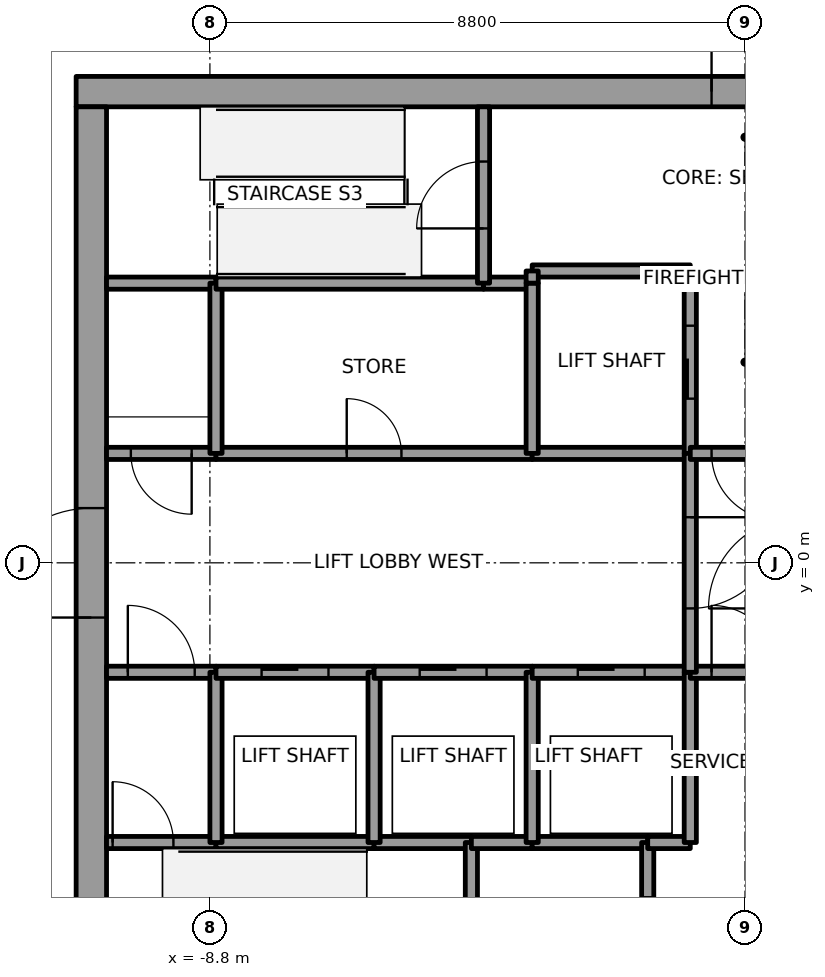
"""IFC4 building model, lengths in metres.
Left out: names, types, materials, properties, quantities, classifications, styles, units other than length and angle.
Written with IfcOpenShell. Run it as: python <this file> out.ifc"""

import sys

from ifc_helpers import new_model, si_unit, direction, frame, frame_2d, origin, place, context, subcontext, project, spatial, rectangle, extrude, element, fill, save


model = new_model("IFC4")
c1 = context("Model", 3, precision=1e-05, world=origin(), true_north=direction((0.0, 1.0)))
c2 = subcontext(c1, "Body", "Model", "MODEL_VIEW")
j1 = project(units=[si_unit("LENGTHUNIT", "METRE"), si_unit("PLANEANGLEUNIT", "RADIAN")], contexts=[c1])
p1 = place(None, origin())
s1 = spatial("IfcSite", under=j1, at=p1, CompositionType="ELEMENT")
p2 = place(p1, origin())
s2 = spatial("IfcBuilding", under=s1, at=p2, CompositionType="ELEMENT")
p3 = place(p2, frame((0.0, 0.0, 291.0)))
s3 = spatial("IfcBuildingStorey", under=s2, at=p3, CompositionType="ELEMENT", Elevation=291.0)
p4 = place(p3, frame((-11.0, 7.75, 0.0), z_axis=(0.0, 0.0, 1.0), x_axis=(1.0, 0.0, 0.0)))
e1 = element("IfcWall", 1, at=p4, inside=s3, PredefinedType="SHEAR", context=c2, shape_type="SweptSolid", body=[
    extrude(rectangle(XDim=22.0, YDim=0.5, at=frame_2d((11.0, 0.0))), origin(), (0.0, 0.0, 1.0), 4.0),
])
p5 = place(p4, frame((10.45, 0.0, 0.0)))
e2 = element("IfcOpeningElement", 2, at=p5, cuts=e1, PredefinedType="OPENING", context=c2, shape_type="SweptSolid", body=[
    extrude(rectangle(XDim=1.1, YDim=2.1, at=frame_2d((0.55, 1.05))), frame((0.0, 0.25, 0.0), z_axis=(0.0, -1.0, 0.0), x_axis=(1.0, 0.0, 0.0)), (0.0, 0.0, 1.0), 0.5),
])
p6 = place(p3, frame((-10.75, -7.5, 0.0), z_axis=(0.0, 0.0, 1.0), x_axis=(0.0, 1.0, 0.0)))
e3 = element("IfcWall", 3, at=p6, inside=s3, PredefinedType="SHEAR", context=c2, shape_type="SweptSolid", body=[
    extrude(rectangle(XDim=15.0, YDim=0.5, at=frame_2d((7.5, 0.0))), origin(), (0.0, 0.0, 1.0), 4.0),
])
p7 = place(p6, frame((6.6, 0.0, 0.0)))
e4 = element("IfcOpeningElement", 4, at=p7, cuts=e3, PredefinedType="OPENING", context=c2, shape_type="SweptSolid", body=[
    extrude(rectangle(XDim=1.8, YDim=2.1, at=frame_2d((0.9, 1.05))), frame((0.0, 0.25, 0.0), z_axis=(0.0, -1.0, 0.0), x_axis=(1.0, 0.0, 0.0)), (0.0, 0.0, 1.0), 0.5),
])
p8 = place(p3, frame((-10.5, -4.6, 0.0), z_axis=(0.0, 0.0, 1.0), x_axis=(1.0, 0.0, 0.0)))
e5 = element("IfcWall", 5, at=p8, inside=s3, PredefinedType="SOLIDWALL", context=c2, shape_type="SweptSolid", body=[
    extrude(rectangle(XDim=1.8, YDim=0.2, at=frame_2d((0.9, 0.0))), origin(), (0.0, 0.0, 1.0), 3.85),
])
p9 = place(p8, frame((0.1, 0.0, 0.0)))
e6 = element("IfcOpeningElement", 6, at=p9, cuts=e5, PredefinedType="OPENING", context=c2, shape_type="SweptSolid", body=[
    extrude(rectangle(XDim=1.0, YDim=2.1, at=frame_2d((0.5, 1.05))), frame((0.0, 0.1, 0.0), z_axis=(0.0, -1.0, 0.0), x_axis=(1.0, 0.0, 0.0)), (0.0, 0.0, 1.0), 0.2),
])
p10 = place(p3, frame((-10.5, -1.8, 0.0), z_axis=(0.0, 0.0, 1.0), x_axis=(1.0, 0.0, 0.0)))
e7 = element("IfcWall", 7, at=p10, inside=s3, PredefinedType="SOLIDWALL", context=c2, shape_type="SweptSolid", body=[
    extrude(rectangle(XDim=1.8, YDim=0.2, at=frame_2d((0.9, 0.0))), origin(), (0.0, 0.0, 1.0), 3.85),
])
p11 = place(p10, frame((0.35, 0.0, 0.0)))
e8 = element("IfcOpeningElement", 8, at=p11, cuts=e7, PredefinedType="OPENING", context=c2, shape_type="SweptSolid", body=[
    extrude(rectangle(XDim=1.1, YDim=2.1, at=frame_2d((0.55, 1.05))), frame((0.0, 0.1, 0.0), z_axis=(0.0, -1.0, 0.0), x_axis=(1.0, 0.0, 0.0)), (0.0, 0.0, 1.0), 0.2),
])
p12 = place(p3, frame((-8.7, 1.8, 0.0), z_axis=(0.0, 0.0, 1.0), x_axis=(-1.0, 0.0, 0.0)))
e9 = element("IfcWall", 9, at=p12, inside=s3, PredefinedType="SOLIDWALL", context=c2, shape_type="SweptSolid", body=[
    extrude(rectangle(XDim=1.8, YDim=0.2, at=frame_2d((0.9, 0.0))), origin(), (0.0, 0.0, 1.0), 3.85),
])
p13 = place(p12, frame((0.4, 0.0, 0.0)))
e10 = element("IfcOpeningElement", 10, at=p13, cuts=e9, PredefinedType="OPENING", context=c2, shape_type="SweptSolid", body=[
    extrude(rectangle(XDim=1.0, YDim=2.1, at=frame_2d((0.5, 1.05))), frame((0.0, 0.1, 0.0), z_axis=(0.0, -1.0, 0.0), x_axis=(1.0, 0.0, 0.0)), (0.0, 0.0, 1.0), 0.2),
])
p14 = place(p3, frame((-8.7, 4.6, 0.0), z_axis=(0.0, 0.0, 1.0), x_axis=(-1.0, 0.0, 0.0)))
e11 = element("IfcWall", 11, at=p14, inside=s3, PredefinedType="SOLIDWALL", context=c2, shape_type="SweptSolid", body=[
    extrude(rectangle(XDim=1.8, YDim=0.2, at=frame_2d((0.9, 0.0))), origin(), (0.0, 0.0, 1.0), 3.85),
])
p15 = place(p3, frame((-8.7, -4.6, 0.0), z_axis=(0.0, 0.0, 1.0), x_axis=(1.0, 0.0, 0.0)))
e12 = element("IfcWall", 12, at=p15, inside=s3, PredefinedType="SOLIDWALL", context=c2, shape_type="SweptSolid", body=[
    extrude(rectangle(XDim=2.6, YDim=0.2, at=frame_2d((1.3, 0.0))), origin(), (0.0, 0.0, 1.0), 3.85),
])
p16 = place(p3, frame((-8.7, -4.6, 0.0), z_axis=(0.0, 0.0, 1.0), x_axis=(0.0, 1.0, 0.0)))
e13 = element("IfcWall", 13, at=p16, inside=s3, PredefinedType="SOLIDWALL", context=c2, shape_type="SweptSolid", body=[
    extrude(rectangle(XDim=2.8, YDim=0.2, at=frame_2d((1.4, 0.0))), origin(), (0.0, 0.0, 1.0), 3.85),
])
p17 = place(p3, frame((-8.7, -1.8, 0.0), z_axis=(0.0, 0.0, 1.0), x_axis=(1.0, 0.0, 0.0)))
e14 = element("IfcWall", 14, at=p17, inside=s3, PredefinedType="SOLIDWALL", context=c2, shape_type="SweptSolid", body=[
    extrude(rectangle(XDim=2.6, YDim=0.2, at=frame_2d((1.3, 0.0))), origin(), (0.0, 0.0, 1.0), 3.85),
])
p18 = place(p17, frame((0.75, 0.0, 0.0)))
e15 = element("IfcOpeningElement", 15, at=p18, cuts=e14, PredefinedType="OPENING", context=c2, shape_type="SweptSolid", body=[
    extrude(rectangle(XDim=1.1, YDim=2.1, at=frame_2d((0.55, 1.05))), frame((0.0, 0.1, 0.0), z_axis=(0.0, -1.0, 0.0), x_axis=(1.0, 0.0, 0.0)), (0.0, 0.0, 1.0), 0.2),
])
p19 = place(p3, frame((-8.7, 1.8, 0.0), z_axis=(0.0, 0.0, 1.0), x_axis=(1.0, 0.0, 0.0)))
e16 = element("IfcWall", 16, at=p19, inside=s3, PredefinedType="SOLIDWALL", context=c2, shape_type="SweptSolid", body=[
    extrude(rectangle(XDim=5.2, YDim=0.2, at=frame_2d((2.6, 0.0))), origin(), (0.0, 0.0, 1.0), 3.85),
])
p20 = place(p19, frame((2.15, 0.0, 0.0)))
e17 = element("IfcOpeningElement", 17, at=p20, cuts=e16, PredefinedType="OPENING", context=c2, shape_type="SweptSolid", body=[
    extrude(rectangle(XDim=0.9, YDim=2.1, at=frame_2d((0.45, 1.05))), frame((0.0, 0.1, 0.0), z_axis=(0.0, -1.0, 0.0), x_axis=(1.0, 0.0, 0.0)), (0.0, 0.0, 1.0), 0.2),
])
p21 = place(p3, frame((-8.7, 4.6, 0.0), z_axis=(0.0, 0.0, 1.0), x_axis=(0.0, -1.0, 0.0)))
e18 = element("IfcWall", 18, at=p21, inside=s3, PredefinedType="SOLIDWALL", context=c2, shape_type="SweptSolid", body=[
    extrude(rectangle(XDim=2.8, YDim=0.2, at=frame_2d((1.4, 0.0))), origin(), (0.0, 0.0, 1.0), 3.85),
])
p22 = place(p3, frame((-4.3, 4.6, 0.0), z_axis=(0.0, 0.0, 1.0), x_axis=(-1.0, 0.0, 0.0)))
e19 = element("IfcWall", 19, at=p22, inside=s3, PredefinedType="SOLIDWALL", context=c2, shape_type="SweptSolid", body=[
    extrude(rectangle(XDim=4.4, YDim=0.2, at=frame_2d((2.2, 0.0))), origin(), (0.0, 0.0, 1.0), 3.85),
])
p23 = place(p3, frame((-6.1, -4.6, 0.0), z_axis=(0.0, 0.0, 1.0), x_axis=(1.0, 0.0, 0.0)))
e20 = element("IfcWall", 20, at=p23, inside=s3, PredefinedType="SOLIDWALL", context=c2, shape_type="SweptSolid", body=[
    extrude(rectangle(XDim=1.6, YDim=0.2, at=frame_2d((0.8, 0.0))), origin(), (0.0, 0.0, 1.0), 3.85),
])
p24 = place(p3, frame((-6.1, -4.6, 0.0), z_axis=(0.0, 0.0, 1.0), x_axis=(0.0, 1.0, 0.0)))
e21 = element("IfcWall", 21, at=p24, inside=s3, PredefinedType="SOLIDWALL", context=c2, shape_type="SweptSolid", body=[
    extrude(rectangle(XDim=2.8, YDim=0.2, at=frame_2d((1.4, 0.0))), origin(), (0.0, 0.0, 1.0), 3.85),
])
p25 = place(p3, frame((-6.1, -1.8, 0.0), z_axis=(0.0, 0.0, 1.0), x_axis=(1.0, 0.0, 0.0)))
e22 = element("IfcWall", 22, at=p25, inside=s3, PredefinedType="SOLIDWALL", context=c2, shape_type="SweptSolid", body=[
    extrude(rectangle(XDim=2.6, YDim=0.2, at=frame_2d((1.3, 0.0))), origin(), (0.0, 0.0, 1.0), 3.85),
])
p26 = place(p25, frame((0.75, 0.0, 0.0)))
e23 = element("IfcOpeningElement", 23, at=p26, cuts=e22, PredefinedType="OPENING", context=c2, shape_type="SweptSolid", body=[
    extrude(rectangle(XDim=1.1, YDim=2.1, at=frame_2d((0.55, 1.05))), frame((0.0, 0.1, 0.0), z_axis=(0.0, -1.0, 0.0), x_axis=(1.0, 0.0, 0.0)), (0.0, 0.0, 1.0), 0.2),
])
p27 = place(p3, frame((-4.5, -4.6, 0.0), z_axis=(0.0, 0.0, 1.0), x_axis=(0.0, -1.0, 0.0)))
e24 = element("IfcWall", 24, at=p27, inside=s3, PredefinedType="SOLIDWALL", context=c2, shape_type="SweptSolid", body=[
    extrude(rectangle(XDim=2.9, YDim=0.2, at=frame_2d((1.45, 0.0))), origin(), (0.0, 0.0, 1.0), 3.85),
])
p28 = place(p3, frame((-4.5, -4.6, 0.0), z_axis=(0.0, 0.0, 1.0), x_axis=(1.0, 0.0, 0.0)))
e25 = element("IfcWall", 25, at=p28, inside=s3, PredefinedType="SOLIDWALL", context=c2, shape_type="SweptSolid", body=[
    extrude(rectangle(XDim=1.0, YDim=0.2, at=frame_2d((0.5, 0.0))), origin(), (0.0, 0.0, 1.0), 3.85),
])
p29 = place(p3, frame((-3.5, 4.6, 0.0), z_axis=(0.0, 0.0, 1.0), x_axis=(-1.0, 0.0, 0.0)))
e26 = element("IfcWall", 26, at=p29, inside=s3, PredefinedType="SOLIDWALL", context=c2, shape_type="SweptSolid", body=[
    extrude(rectangle(XDim=0.8, YDim=0.2, at=frame_2d((0.4, 0.0))), origin(), (0.0, 0.0, 1.0), 3.85),
])
p30 = place(p3, frame((-4.3, 4.6, 0.0), z_axis=(0.0, 0.0, 1.0), x_axis=(0.0, 1.0, 0.0)))
e27 = element("IfcWall", 27, at=p30, inside=s3, PredefinedType="SOLIDWALL", context=c2, shape_type="SweptSolid", body=[
    extrude(rectangle(XDim=2.9, YDim=0.2, at=frame_2d((1.45, 0.0))), origin(), (0.0, 0.0, 1.0), 3.85),
])
p31 = place(p30, frame((0.9, 0.0, 0.0)))
e28 = element("IfcOpeningElement", 28, at=p31, cuts=e27, PredefinedType="OPENING", context=c2, shape_type="SweptSolid", body=[
    extrude(rectangle(XDim=1.1, YDim=2.1, at=frame_2d((0.55, 1.05))), frame((0.0, 0.1, 0.0), z_axis=(0.0, -1.0, 0.0), x_axis=(1.0, 0.0, 0.0)), (0.0, 0.0, 1.0), 0.2),
])
p32 = place(p3, frame((-3.5, -4.6, 0.0), z_axis=(0.0, 0.0, 1.0), x_axis=(1.0, 0.0, 0.0)))
e29 = element("IfcWall", 29, at=p32, inside=s3, PredefinedType="SOLIDWALL", context=c2, shape_type="SweptSolid", body=[
    extrude(rectangle(XDim=1.9, YDim=0.2, at=frame_2d((0.95, 0.0))), origin(), (0.0, 0.0, 1.0), 3.85),
])
p33 = place(p3, frame((-3.5, -4.6, 0.0), z_axis=(0.0, 0.0, 1.0), x_axis=(0.0, 1.0, 0.0)))
e30 = element("IfcWall", 30, at=p33, inside=s3, PredefinedType="SOLIDWALL", context=c2, shape_type="SweptSolid", body=[
    extrude(rectangle(XDim=2.8, YDim=0.2, at=frame_2d((1.4, 0.0))), origin(), (0.0, 0.0, 1.0), 3.85),
])
p34 = place(p3, frame((-3.5, -1.8, 0.0), z_axis=(0.0, 0.0, 1.0), x_axis=(1.0, 0.0, 0.0)))
e31 = element("IfcWall", 31, at=p34, inside=s3, PredefinedType="SOLIDWALL", context=c2, shape_type="SweptSolid", body=[
    extrude(rectangle(XDim=2.6, YDim=0.2, at=frame_2d((1.3, 0.0))), origin(), (0.0, 0.0, 1.0), 3.85),
])
p35 = place(p34, frame((0.75, 0.0, 0.0)))
e32 = element("IfcOpeningElement", 32, at=p35, cuts=e31, PredefinedType="OPENING", context=c2, shape_type="SweptSolid", body=[
    extrude(rectangle(XDim=1.1, YDim=2.1, at=frame_2d((0.55, 1.05))), frame((0.0, 0.1, 0.0), z_axis=(0.0, -1.0, 0.0), x_axis=(1.0, 0.0, 0.0)), (0.0, 0.0, 1.0), 0.2),
])
p36 = place(p3, frame((-0.9, 1.8, 0.0), z_axis=(0.0, 0.0, 1.0), x_axis=(-1.0, 0.0, 0.0)))
e33 = element("IfcWall", 33, at=p36, inside=s3, PredefinedType="SOLIDWALL", context=c2, shape_type="SweptSolid", body=[
    extrude(rectangle(XDim=2.6, YDim=0.2, at=frame_2d((1.3, 0.0))), origin(), (0.0, 0.0, 1.0), 3.85),
])
p37 = place(p3, frame((-3.5, 1.8, 0.0), z_axis=(0.0, 0.0, 1.0), x_axis=(0.0, 1.0, 0.0)))
e34 = element("IfcWall", 34, at=p37, inside=s3, PredefinedType="SOLIDWALL", context=c2, shape_type="SweptSolid", body=[
    extrude(rectangle(XDim=2.8, YDim=0.2, at=frame_2d((1.4, 0.0))), origin(), (0.0, 0.0, 1.0), 3.85),
])
p38 = place(p3, frame((-0.9, 1.8, 0.0), z_axis=(0.0, 0.0, 1.0), x_axis=(0.0, 1.0, 0.0)))
e35 = element("IfcWall", 35, at=p38, inside=s3, PredefinedType="SOLIDWALL", context=c2, shape_type="SweptSolid", body=[
    extrude(rectangle(XDim=3.0, YDim=0.2, at=frame_2d((1.5, 0.0))), origin(), (0.0, 0.0, 1.0), 3.85),
])
p39 = place(p38, frame((0.9, 0.0, 0.0)))
e36 = element("IfcOpeningElement", 36, at=p39, cuts=e35, PredefinedType="OPENING", context=c2, shape_type="SweptSolid", body=[
    extrude(rectangle(XDim=1.2, YDim=2.1, at=frame_2d((0.6, 1.05))), frame((0.0, 0.1, 0.0), z_axis=(0.0, -1.0, 0.0), x_axis=(1.0, 0.0, 0.0)), (0.0, 0.0, 1.0), 0.2),
])
p40 = place(p3, frame((-0.9, 4.8, 0.0), z_axis=(0.0, 0.0, 1.0), x_axis=(-1.0, 0.0, 0.0)))
e37 = element("IfcWall", 37, at=p40, inside=s3, PredefinedType="SOLIDWALL", context=c2, shape_type="SweptSolid", body=[
    extrude(rectangle(XDim=2.6, YDim=0.2, at=frame_2d((1.3, 0.0))), origin(), (0.0, 0.0, 1.0), 3.85),
])
p41 = place(p3, frame((-3.5, 4.8, 0.0), z_axis=(0.0, 0.0, 1.0), x_axis=(0.0, -1.0, 0.0)))
e38 = element("IfcWall", 38, at=p41, inside=s3, PredefinedType="SOLIDWALL", context=c2, shape_type="SweptSolid", body=[
    extrude(rectangle(XDim=0.2, YDim=0.2, at=frame_2d((0.1, 0.0))), origin(), (0.0, 0.0, 1.0), 3.85),
])
p42 = place(p3, frame((-1.6, -7.5, 0.0), z_axis=(0.0, 0.0, 1.0), x_axis=(0.0, 1.0, 0.0)))
e39 = element("IfcWall", 39, at=p42, inside=s3, PredefinedType="SOLIDWALL", context=c2, shape_type="SweptSolid", body=[
    extrude(rectangle(XDim=2.9, YDim=0.2, at=frame_2d((1.45, 0.0))), origin(), (0.0, 0.0, 1.0), 3.85),
])
p43 = place(p42, frame((0.9, 0.0, 0.0)))
e40 = element("IfcOpeningElement", 40, at=p43, cuts=e39, PredefinedType="OPENING", context=c2, shape_type="SweptSolid", body=[
    extrude(rectangle(XDim=1.1, YDim=2.1, at=frame_2d((0.55, 1.05))), frame((0.0, 0.1, 0.0), z_axis=(0.0, -1.0, 0.0), x_axis=(1.0, 0.0, 0.0)), (0.0, 0.0, 1.0), 0.2),
])
p44 = place(p3, frame((-1.6, -4.6, 0.0), z_axis=(0.0, 0.0, 1.0), x_axis=(1.0, 0.0, 0.0)))
e41 = element("IfcWall", 41, at=p44, inside=s3, PredefinedType="SOLIDWALL", context=c2, shape_type="SweptSolid", body=[
    extrude(rectangle(XDim=0.7, YDim=0.2, at=frame_2d((0.35, 0.0))), origin(), (0.0, 0.0, 1.0), 3.85),
])
p45 = place(p3, frame((-0.9, -4.6, 0.0), z_axis=(0.0, 0.0, 1.0), x_axis=(0.0, 1.0, 0.0)))
e42 = element("IfcWall", 42, at=p45, inside=s3, PredefinedType="SOLIDWALL", context=c2, shape_type="SweptSolid", body=[
    extrude(rectangle(XDim=2.8, YDim=0.2, at=frame_2d((1.4, 0.0))), origin(), (0.0, 0.0, 1.0), 3.85),
])
p46 = place(p3, frame((-0.9, -1.8, 0.0), z_axis=(0.0, 0.0, 1.0), x_axis=(1.0, 0.0, 0.0)))
e43 = element("IfcWall", 43, at=p46, inside=s3, PredefinedType="SOLIDWALL", context=c2, shape_type="SweptSolid", body=[
    extrude(rectangle(XDim=1.8, YDim=0.2, at=frame_2d((0.9, 0.0))), origin(), (0.0, 0.0, 1.0), 3.85),
])
p47 = place(p46, frame((0.35, 0.0, 0.0)))
e44 = element("IfcOpeningElement", 44, at=p47, cuts=e43, PredefinedType="OPENING", context=c2, shape_type="SweptSolid", body=[
    extrude(rectangle(XDim=1.1, YDim=2.1, at=frame_2d((0.55, 1.05))), frame((0.0, 0.1, 0.0), z_axis=(0.0, -1.0, 0.0), x_axis=(1.0, 0.0, 0.0)), (0.0, 0.0, 1.0), 0.2),
])
p48 = place(p3, frame((-0.9, 1.8, 0.0), z_axis=(0.0, 0.0, 1.0), x_axis=(0.0, -1.0, 0.0)))
e45 = element("IfcWall", 45, at=p48, inside=s3, PredefinedType="SOLIDWALL", context=c2, shape_type="SweptSolid", body=[
    extrude(rectangle(XDim=3.6, YDim=0.2, at=frame_2d((1.8, 0.0))), origin(), (0.0, 0.0, 1.0), 3.85),
])
p49 = place(p48, frame((1.05, 0.0, 0.0)))
e46 = element("IfcOpeningElement", 46, at=p49, cuts=e45, PredefinedType="OPENING", context=c2, shape_type="SweptSolid", body=[
    extrude(rectangle(XDim=1.5, YDim=2.1, at=frame_2d((0.75, 1.05))), frame((0.0, 0.1, 0.0), z_axis=(0.0, -1.0, 0.0), x_axis=(1.0, 0.0, 0.0)), (0.0, 0.0, 1.0), 0.2),
])
p50 = place(p3, frame((0.9, 1.8, 0.0), z_axis=(0.0, 0.0, 1.0), x_axis=(-1.0, 0.0, 0.0)))
e47 = element("IfcWall", 47, at=p50, inside=s3, PredefinedType="SOLIDWALL", context=c2, shape_type="SweptSolid", body=[
    extrude(rectangle(XDim=1.8, YDim=0.2, at=frame_2d((0.9, 0.0))), origin(), (0.0, 0.0, 1.0), 3.85),
])
p51 = place(p50, frame((0.35, 0.0, 0.0)))
e48 = element("IfcOpeningElement", 48, at=p51, cuts=e47, PredefinedType="OPENING", context=c2, shape_type="SweptSolid", body=[
    extrude(rectangle(XDim=1.1, YDim=2.1, at=frame_2d((0.55, 1.05))), frame((0.0, 0.1, 0.0), z_axis=(0.0, -1.0, 0.0), x_axis=(1.0, 0.0, 0.0)), (0.0, 0.0, 1.0), 0.2),
])
p52 = place(p18, origin())
e49 = element("IfcDoor", 49, at=p52, inside=s3, OperationType="SLIDING_TO_LEFT", PredefinedType="DOOR", context=c2, shape_type="SweptSolid", body=[
    extrude(rectangle(XDim=1.1, YDim=2.1, at=frame_2d((0.55, 1.05))), frame((0.0, 0.025, 0.0), z_axis=(0.0, -1.0, 0.0), x_axis=(1.0, 0.0, 0.0)), (0.0, 0.0, 1.0), 0.05),
])
fill(e15, e49)
p53 = place(p26, origin())
e50 = element("IfcDoor", 50, at=p53, inside=s3, OperationType="SLIDING_TO_RIGHT", PredefinedType="DOOR", context=c2, shape_type="SweptSolid", body=[
    extrude(rectangle(XDim=1.1, YDim=2.1, at=frame_2d((0.55, 1.05))), frame((0.0, 0.025, 0.0), z_axis=(0.0, -1.0, 0.0), x_axis=(1.0, 0.0, 0.0)), (0.0, 0.0, 1.0), 0.05),
])
fill(e23, e50)
p54 = place(p35, origin())
e51 = element("IfcDoor", 51, at=p54, inside=s3, OperationType="SLIDING_TO_RIGHT", PredefinedType="DOOR", context=c2, shape_type="SweptSolid", body=[
    extrude(rectangle(XDim=1.1, YDim=2.1, at=frame_2d((0.55, 1.05))), frame((0.0, 0.025, 0.0), z_axis=(0.0, -1.0, 0.0), x_axis=(1.0, 0.0, 0.0)), (0.0, 0.0, 1.0), 0.05),
])
fill(e32, e51)
p55 = place(p39, origin())
e52 = element("IfcDoor", 52, at=p55, inside=s3, OperationType="SLIDING_TO_RIGHT", PredefinedType="DOOR", context=c2, shape_type="SweptSolid", body=[
    extrude(rectangle(XDim=1.2, YDim=2.1, at=frame_2d((0.6, 1.05))), frame((0.0, 0.025, 0.0), z_axis=(0.0, -1.0, 0.0), x_axis=(1.0, 0.0, 0.0)), (0.0, 0.0, 1.0), 0.05),
])
fill(e36, e52)
p56 = place(p49, origin())
e53 = element("IfcDoor", 53, at=p56, inside=s3, OperationType="DOUBLE_DOOR_SINGLE_SWING", PredefinedType="DOOR", context=c2, shape_type="SweptSolid", body=[
    extrude(rectangle(XDim=1.5, YDim=2.1, at=frame_2d((0.75, 1.05))), frame((0.0, 0.025, 0.0), z_axis=(0.0, -1.0, 0.0), x_axis=(1.0, 0.0, 0.0)), (0.0, 0.0, 1.0), 0.05),
])
fill(e46, e53)
p57 = place(p11, origin())
e54 = element("IfcDoor", 54, at=p57, inside=s3, OperationType="SINGLE_SWING_LEFT", PredefinedType="DOOR", context=c2, shape_type="SweptSolid", body=[
    extrude(rectangle(XDim=1.1, YDim=2.1, at=frame_2d((0.55, 1.05))), frame((0.0, 0.025, 0.0), z_axis=(0.0, -1.0, 0.0), x_axis=(1.0, 0.0, 0.0)), (0.0, 0.0, 1.0), 0.05),
])
fill(e8, e54)
p58 = place(p51, origin())
e55 = element("IfcDoor", 55, at=p58, inside=s3, OperationType="SINGLE_SWING_LEFT", PredefinedType="DOOR", context=c2, shape_type="SweptSolid", body=[
    extrude(rectangle(XDim=1.1, YDim=2.1, at=frame_2d((0.55, 1.05))), frame((0.0, 0.025, 0.0), z_axis=(0.0, -1.0, 0.0), x_axis=(1.0, 0.0, 0.0)), (0.0, 0.0, 1.0), 0.05),
])
fill(e48, e55)
p59 = place(p47, origin())
e56 = element("IfcDoor", 56, at=p59, inside=s3, OperationType="SINGLE_SWING_RIGHT", PredefinedType="DOOR", context=c2, shape_type="SweptSolid", body=[
    extrude(rectangle(XDim=1.1, YDim=2.1, at=frame_2d((0.55, 1.05))), frame((0.0, 0.025, 0.0), z_axis=(0.0, -1.0, 0.0), x_axis=(1.0, 0.0, 0.0)), (0.0, 0.0, 1.0), 0.05),
])
fill(e44, e56)
p60 = place(p13, origin())
e57 = element("IfcDoor", 57, at=p60, inside=s3, OperationType="SINGLE_SWING_LEFT", PredefinedType="DOOR", context=c2, shape_type="SweptSolid", body=[
    extrude(rectangle(XDim=1.0, YDim=2.1, at=frame_2d((0.5, 1.05))), frame((0.0, 0.025, 0.0), z_axis=(0.0, -1.0, 0.0), x_axis=(1.0, 0.0, 0.0)), (0.0, 0.0, 1.0), 0.05),
])
fill(e10, e57)
p61 = place(p9, origin())
e58 = element("IfcDoor", 58, at=p61, inside=s3, OperationType="SINGLE_SWING_LEFT", PredefinedType="DOOR", context=c2, shape_type="SweptSolid", body=[
    extrude(rectangle(XDim=1.0, YDim=2.1, at=frame_2d((0.5, 1.05))), frame((0.0, 0.025, 0.0), z_axis=(0.0, -1.0, 0.0), x_axis=(1.0, 0.0, 0.0)), (0.0, 0.0, 1.0), 0.05),
])
fill(e6, e58)
p62 = place(p31, origin())
e59 = element("IfcDoor", 59, at=p62, inside=s3, OperationType="SINGLE_SWING_LEFT", PredefinedType="DOOR", context=c2, shape_type="SweptSolid", body=[
    extrude(rectangle(XDim=1.1, YDim=2.1, at=frame_2d((0.55, 1.05))), frame((0.0, 0.025, 0.0), z_axis=(0.0, -1.0, 0.0), x_axis=(1.0, 0.0, 0.0)), (0.0, 0.0, 1.0), 0.05),
])
fill(e28, e59)
p63 = place(p20, origin())
e60 = element("IfcDoor", 60, at=p63, inside=s3, OperationType="SINGLE_SWING_RIGHT", PredefinedType="DOOR", context=c2, shape_type="SweptSolid", body=[
    extrude(rectangle(XDim=0.9, YDim=2.1, at=frame_2d((0.45, 1.05))), frame((0.0, 0.025, 0.0), z_axis=(0.0, -1.0, 0.0), x_axis=(1.0, 0.0, 0.0)), (0.0, 0.0, 1.0), 0.05),
])
fill(e17, e60)
p64 = place(p7, origin())
e61 = element("IfcDoor", 61, at=p64, inside=s3, OperationType="DOUBLE_DOOR_SINGLE_SWING", PredefinedType="DOOR", context=c2, shape_type="SweptSolid", body=[
    extrude(rectangle(XDim=1.8, YDim=2.1, at=frame_2d((0.9, 1.05))), frame((0.0, 0.025, 0.0), z_axis=(0.0, -1.0, 0.0), x_axis=(1.0, 0.0, 0.0)), (0.0, 0.0, 1.0), 0.05),
])
fill(e4, e61)
p65 = place(p5, origin())
e62 = element("IfcDoor", 62, at=p65, inside=s3, OperationType="SINGLE_SWING_RIGHT", PredefinedType="DOOR", context=c2, shape_type="SweptSolid", body=[
    extrude(rectangle(XDim=1.1, YDim=2.1, at=frame_2d((0.55, 1.05))), frame((0.0, 0.025, 0.0), z_axis=(0.0, -1.0, 0.0), x_axis=(1.0, 0.0, 0.0)), (0.0, 0.0, 1.0), 0.05),
])
fill(e2, e62)
save(model, sys.argv[1])
